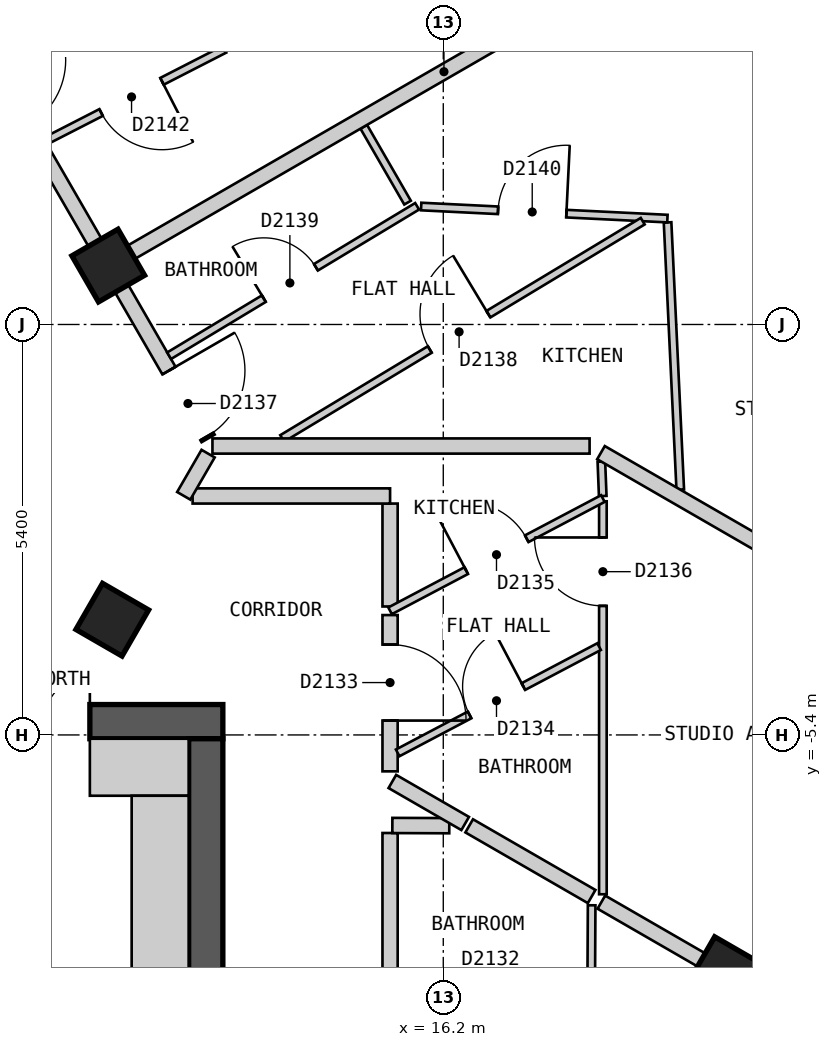
"""IFC4 building model, lengths in metres.
Left out: names, types, materials, properties, quantities, classifications, styles, units other than length and angle.
Written with IfcOpenShell. Run it as: python <this file> out.ifc"""

import sys

from ifc_helpers import new_model, si_unit, direction, frame, frame_2d, origin, origin_2d, place, context, subcontext, project, spatial, polyline, rectangle, outline, extrude, element, fill, save


model = new_model("IFC4")
c1 = context("Model", 3, precision=1e-05, world=origin(), true_north=direction((0.0, 1.0)))
c2 = subcontext(c1, "Body", "Model", "MODEL_VIEW")
j1 = project(units=[si_unit("LENGTHUNIT", "METRE"), si_unit("PLANEANGLEUNIT", "RADIAN")], contexts=[c1])
p1 = place(None, origin())
s1 = spatial("IfcSite", under=j1, at=p1, CompositionType="ELEMENT")
p2 = place(p1, origin())
s2 = spatial("IfcBuilding", under=s1, at=p2, CompositionType="ELEMENT")
p3 = place(p2, frame((0.0, 0.0, 205.8)))
s3 = spatial("IfcBuildingStorey", under=s2, at=p3, CompositionType="ELEMENT", Elevation=205.8)
for number, where, z_axis, x_axis in (
    (1, (19.899, -8.534, 0.0), (0.0, 0.0, 1.0), (0.5, 0.866, 0.0)),
    (2, (11.845, -3.884, 0.0), (0.0, 0.0, 1.0), (0.5, 0.866, 0.0)),
    (3, (11.792, 0.775, 0.0), (0.0, 0.0, 1.0), (-0.5, 0.866, 0.0)),
):
    element("IfcColumn", number, at=place(p3, frame(where, z_axis=z_axis, x_axis=x_axis)), inside=s3, PredefinedType="COLUMN", context=c2, shape_type="SweptSolid", body=[
        extrude(rectangle(XDim=0.7, YDim=0.7, at=origin_2d()), origin(), (0.0, 0.0, 1.0), 3.0),
    ])
p4 = place(p3, frame((-13.3, -5.225, 0.0), z_axis=(0.0, 0.0, 1.0), x_axis=(1.0, 0.0, 0.0)))
e4 = element("IfcWall", 4, at=p4, inside=s3, PredefinedType="SHEAR", context=c2, shape_type="SweptSolid", body=[
    extrude(rectangle(XDim=26.6, YDim=0.45, at=frame_2d((13.3, 0.0))), origin(), (0.0, 0.0, 1.0), 2.7),
])
p5 = place(p4, frame((23.65, 0.0, 0.0)))
e5 = element("IfcOpeningElement", 5, at=p5, cuts=e4, PredefinedType="OPENING", context=c2, shape_type="SweptSolid", body=[
    extrude(rectangle(XDim=1.2, YDim=2.1, at=frame_2d((0.6, 1.05))), frame((0.0, 0.235, 0.0), z_axis=(0.0, -1.0, 0.0), x_axis=(1.0, 0.0, 0.0)), (0.0, 0.0, 1.0), 0.47),
])
p6 = place(p3, frame((13.075, -18.55, 0.0), z_axis=(0.0, 0.0, 1.0), x_axis=(0.0, 1.0, 0.0)))
e6 = element("IfcWall", 6, at=p6, inside=s3, PredefinedType="SHEAR", context=c2, shape_type="SweptSolid", body=[
    extrude(rectangle(XDim=13.1, YDim=0.45, at=frame_2d((6.55, 0.0))), origin(), (0.0, 0.0, 1.0), 2.7),
])
p7 = place(p3, frame((15.285, -18.425, 0.0), z_axis=(0.0, 0.0, 1.0), x_axis=(0.500012653391, 0.866018098222, 0.0)))
e7 = element("IfcWall", 7, at=p7, inside=s3, PredefinedType="SOLIDWALL", context=c2, shape_type="SweptSolid", body=[
    extrude(outline(polyline([(0.0, -0.15), (16.628, -0.15), (16.548, 0.15), (0.08, 0.15), (0.0, -0.15)])), origin(), (0.0, 0.0, 1.0), 2.7),
])
p8 = place(p7, frame((2.444, 0.0, 0.15)))
e8 = element("IfcOpeningElement", 8, at=p8, cuts=e7, PredefinedType="OPENING", context=c2, shape_type="SweptSolid", body=[
    extrude(rectangle(XDim=1.5, YDim=2.1, at=frame_2d((0.75, 1.05))), frame((0.0, 0.16, 0.0), z_axis=(0.0, -1.0, 0.0), x_axis=(1.0, 0.0, 0.0)), (0.0, 0.0, 1.0), 0.32),
])
p9 = place(p7, frame((7.564, 0.0, 0.15)))
e9 = element("IfcOpeningElement", 9, at=p9, cuts=e7, PredefinedType="OPENING", context=c2, shape_type="SweptSolid", body=[
    extrude(rectangle(XDim=1.5, YDim=2.1, at=frame_2d((0.75, 1.05))), frame((0.0, 0.16, 0.0), z_axis=(0.0, -1.0, 0.0), x_axis=(1.0, 0.0, 0.0)), (0.0, 0.0, 1.0), 0.32),
])
p10 = place(p7, frame((12.682, 0.0, 0.15)))
e10 = element("IfcOpeningElement", 10, at=p10, cuts=e7, PredefinedType="OPENING", context=c2, shape_type="SweptSolid", body=[
    extrude(rectangle(XDim=1.5, YDim=2.1, at=frame_2d((0.75, 1.05))), frame((0.0, 0.16, 0.0), z_axis=(0.0, -1.0, 0.0), x_axis=(1.0, 0.0, 0.0)), (0.0, 0.0, 1.0), 0.32),
])
p11 = place(p3, frame((23.599, 0.825, 0.0), z_axis=(0.0, 0.0, 1.0), x_axis=(-0.500003656944, 0.866023292436, 0.0)))
e11 = element("IfcWall", 11, at=p11, inside=s3, PredefinedType="SOLIDWALL", context=c2, shape_type="SweptSolid", body=[
    extrude(outline(polyline([(0.0, -0.15), (22.17, -0.15), (22.09, 0.15), (0.08, 0.15), (0.0, -0.15)])), origin(), (0.0, 0.0, 1.0), 2.7),
])
p12 = place(p11, frame((2.497, 0.0, 0.15)))
e12 = element("IfcOpeningElement", 12, at=p12, cuts=e11, PredefinedType="OPENING", context=c2, shape_type="SweptSolid", body=[
    extrude(rectangle(XDim=1.5, YDim=2.1, at=frame_2d((0.75, 1.05))), frame((0.0, 0.16, 0.0), z_axis=(0.0, -1.0, 0.0), x_axis=(1.0, 0.0, 0.0)), (0.0, 0.0, 1.0), 0.32),
])
p13 = place(p11, frame((7.723, 0.0, 0.15)))
e13 = element("IfcOpeningElement", 13, at=p13, cuts=e11, PredefinedType="OPENING", context=c2, shape_type="SweptSolid", body=[
    extrude(rectangle(XDim=1.5, YDim=2.1, at=frame_2d((0.75, 1.05))), frame((0.0, 0.16, 0.0), z_axis=(0.0, -1.0, 0.0), x_axis=(1.0, 0.0, 0.0)), (0.0, 0.0, 1.0), 0.32),
])
p14 = place(p11, frame((12.948, 0.0, 0.15)))
e14 = element("IfcOpeningElement", 14, at=p14, cuts=e11, PredefinedType="OPENING", context=c2, shape_type="SweptSolid", body=[
    extrude(rectangle(XDim=1.5, YDim=2.1, at=frame_2d((0.75, 1.05))), frame((0.0, 0.16, 0.0), z_axis=(0.0, -1.0, 0.0), x_axis=(1.0, 0.0, 0.0)), (0.0, 0.0, 1.0), 0.32),
])
p15 = place(p11, frame((18.173, 0.0, 0.15)))
e15 = element("IfcOpeningElement", 15, at=p15, cuts=e11, PredefinedType="OPENING", context=c2, shape_type="SweptSolid", body=[
    extrude(rectangle(XDim=1.5, YDim=2.1, at=frame_2d((0.75, 1.05))), frame((0.0, 0.16, 0.0), z_axis=(0.0, -1.0, 0.0), x_axis=(1.0, 0.0, 0.0)), (0.0, 0.0, 1.0), 0.32),
])
p16 = place(p3, frame((9.238, 5.2, 0.0), z_axis=(0.0, 0.0, 1.0), x_axis=(0.500025705601, -0.86601056214, 0.0)))
e16 = element("IfcWall", 16, at=p16, inside=s3, PredefinedType="PARTITIONING", context=c2, shape_type="SweptSolid", body=[
    extrude(rectangle(XDim=7.735, YDim=0.2, at=frame_2d((3.868, 0.0))), origin(), (0.0, 0.0, 1.0), 2.7),
])
p17 = place(p16, frame((6.705, 0.0, 0.0)))
e17 = element("IfcOpeningElement", 17, at=p17, cuts=e16, PredefinedType="OPENING", context=c2, shape_type="SweptSolid", body=[
    extrude(rectangle(XDim=1.0, YDim=2.1, at=frame_2d((0.5, 1.05))), frame((0.0, 0.11, 0.0), z_axis=(0.0, -1.0, 0.0), x_axis=(1.0, 0.0, 0.0)), (0.0, 0.0, 1.0), 0.22),
])
p18 = place(p16, frame((1.988, 0.0, 0.0)))
e18 = element("IfcOpeningElement", 18, at=p18, cuts=e16, PredefinedType="OPENING", context=c2, shape_type="SweptSolid", body=[
    extrude(rectangle(XDim=1.0, YDim=2.1, at=frame_2d((0.5, 1.05))), frame((0.0, 0.11, 0.0), z_axis=(0.0, -1.0, 0.0), x_axis=(1.0, 0.0, 0.0)), (0.0, 0.0, 1.0), 0.22),
])
p19 = place(p3, frame((15.5, -2.356, 0.0), z_axis=(0.0, 0.0, 1.0), x_axis=(0.0, -1.0, 0.0)))
e19 = element("IfcWall", 19, at=p19, inside=s3, PredefinedType="PARTITIONING", context=c2, shape_type="SweptSolid", body=[
    extrude(rectangle(XDim=1.354, YDim=0.2, at=frame_2d((0.677, 0.0))), origin(), (0.0, 0.0, 1.0), 2.7),
])
p20 = place(p3, frame((12.902, -2.256, 0.0), z_axis=(0.0, 0.0, 1.0), x_axis=(1.0, 0.0, 0.0)))
e20 = element("IfcWall", 20, at=p20, inside=s3, PredefinedType="PARTITIONING", context=c2, shape_type="SweptSolid", body=[
    extrude(rectangle(XDim=2.598, YDim=0.2, at=frame_2d((1.299, 0.0))), origin(), (0.0, 0.0, 1.0), 2.7),
])
p21 = place(p3, frame((12.785, -2.254, 0.0), z_axis=(0.0, 0.0, 1.0), x_axis=(0.500766044352, 0.865582675903, 0.0)))
e21 = element("IfcWall", 21, at=p21, inside=s3, PredefinedType="PARTITIONING", context=c2, shape_type="SweptSolid", body=[
    extrude(rectangle(XDim=0.641, YDim=0.2, at=frame_2d((0.321, 0.0))), origin(), (0.0, 0.0, 1.0), 2.7),
])
p22 = place(p3, frame((15.5, -17.752, 0.0), z_axis=(0.0, 0.0, 1.0), x_axis=(0.0, 1.0, 0.0)))
e22 = element("IfcWall", 22, at=p22, inside=s3, PredefinedType="PARTITIONING", context=c2, shape_type="SweptSolid", body=[
    extrude(rectangle(XDim=11.062, YDim=0.2, at=frame_2d((5.531, 0.0))), origin(), (0.0, 0.0, 1.0), 2.7),
])
p23 = place(p22, frame((7.361, 0.0, 0.0)))
e23 = element("IfcOpeningElement", 23, at=p23, cuts=e22, PredefinedType="OPENING", context=c2, shape_type="SweptSolid", body=[
    extrude(rectangle(XDim=1.0, YDim=2.1, at=frame_2d((0.5, 1.05))), frame((0.0, 0.11, 0.0), z_axis=(0.0, -1.0, 0.0), x_axis=(1.0, 0.0, 0.0)), (0.0, 0.0, 1.0), 0.22),
])
p24 = place(p3, frame((15.5, -5.879, 0.0), z_axis=(0.0, 0.0, 1.0), x_axis=(0.0, 1.0, 0.0)))
e24 = element("IfcWall", 24, at=p24, inside=s3, PredefinedType="PARTITIONING", context=c2, shape_type="SweptSolid", body=[
    extrude(rectangle(XDim=2.056, YDim=0.2, at=frame_2d((1.028, 0.0))), origin(), (0.0, 0.0, 1.0), 2.7),
])
p25 = place(p24, frame((0.668, 0.0, 0.0)))
e25 = element("IfcOpeningElement", 25, at=p25, cuts=e24, PredefinedType="OPENING", context=c2, shape_type="SweptSolid", body=[
    extrude(rectangle(XDim=1.0, YDim=2.1, at=frame_2d((0.5, 1.05))), frame((0.0, 0.11, 0.0), z_axis=(0.0, -1.0, 0.0), x_axis=(1.0, 0.0, 0.0)), (0.0, 0.0, 1.0), 0.22),
])
p26 = place(p3, frame((15.154, 2.601, 0.0), z_axis=(0.0, 0.0, 1.0), x_axis=(0.499808046739, -0.866136199691, 0.0)))
e26 = element("IfcWall", 26, at=p26, inside=s3, PredefinedType="PARTITIONING", context=c2, shape_type="SweptSolid", body=[
    extrude(rectangle(XDim=1.152, YDim=0.1, at=frame_2d((0.576, 0.0))), origin(), (0.0, 0.0, 1.0), 2.7),
])
p27 = place(p3, frame((18.28, -1.804, 0.0), z_axis=(0.0, 0.0, 1.0), x_axis=(0.039839036731, -0.999206110446, 0.0)))
e27 = element("IfcWall", 27, at=p27, inside=s3, PredefinedType="PARTITIONING", context=c2, shape_type="SweptSolid", body=[
    extrude(rectangle(XDim=0.453, YDim=0.1, at=frame_2d((0.227, 0.0))), origin(), (0.0, 0.0, 1.0), 2.7),
])
p28 = place(p3, frame((19.151, 1.343, 0.0), z_axis=(0.0, 0.0, 1.0), x_axis=(0.047509130714, -0.998870803707, 0.0)))
e28 = element("IfcWall", 28, at=p28, inside=s3, PredefinedType="PARTITIONING", context=c2, shape_type="SweptSolid", body=[
    extrude(rectangle(XDim=3.52, YDim=0.1, at=frame_2d((1.76, 0.0))), origin(), (0.0, 0.0, 1.0), 2.7),
])
p29 = place(p3, frame((15.909, 1.552, 0.0), z_axis=(0.0, 0.0, 1.0), x_axis=(0.998799003463, -0.048995414909, 0.0)))
e29 = element("IfcWall", 29, at=p29, inside=s3, PredefinedType="PARTITIONING", context=c2, shape_type="SweptSolid", body=[
    extrude(rectangle(XDim=3.244, YDim=0.1, at=frame_2d((1.622, 0.0))), origin(), (0.0, 0.0, 1.0), 2.7),
])
p30 = place(p29, frame((1.013, 0.0, 0.0)))
e30 = element("IfcOpeningElement", 30, at=p30, cuts=e29, PredefinedType="OPENING", context=c2, shape_type="SweptSolid", body=[
    extrude(rectangle(XDim=0.9, YDim=2.1, at=frame_2d((0.45, 1.05))), frame((0.0, 0.06, 0.0), z_axis=(0.0, -1.0, 0.0), x_axis=(1.0, 0.0, 0.0)), (0.0, 0.0, 1.0), 0.12),
])
p31 = place(p3, frame((18.135, -10.893, 0.0), z_axis=(0.0, 0.0, 1.0), x_axis=(0.005255182688, 0.999986191432, 0.0)))
e31 = element("IfcWall", 31, at=p31, inside=s3, PredefinedType="PARTITIONING", context=c2, shape_type="SweptSolid", body=[
    extrude(rectangle(XDim=3.252, YDim=0.1, at=frame_2d((1.626, 0.0))), origin(), (0.0, 0.0, 1.0), 2.7),
])
p32 = place(p3, frame((18.3, -7.496, 0.0), z_axis=(0.0, 0.0, 1.0), x_axis=(0.0, 1.0, 0.0)))
e32 = element("IfcWall", 32, at=p32, inside=s3, PredefinedType="PARTITIONING", context=c2, shape_type="SweptSolid", body=[
    extrude(rectangle(XDim=5.17, YDim=0.1, at=frame_2d((2.585, 0.0))), origin(), (0.0, 0.0, 1.0), 2.7),
])
p33 = place(p32, frame((3.794, 0.0, 0.0)))
e33 = element("IfcOpeningElement", 33, at=p33, cuts=e32, PredefinedType="OPENING", context=c2, shape_type="SweptSolid", body=[
    extrude(rectangle(XDim=0.9, YDim=2.1, at=frame_2d((0.45, 1.05))), frame((0.0, 0.06, 0.0), z_axis=(0.0, -1.0, 0.0), x_axis=(1.0, 0.0, 0.0)), (0.0, 0.0, 1.0), 0.12),
])
p34 = place(p3, frame((10.963, 2.412, 0.0), z_axis=(0.0, 0.0, 1.0), x_axis=(0.889943997558, 0.456069820543, 0.0)))
e34 = element("IfcWall", 34, at=p34, inside=s3, PredefinedType="PARTITIONING", context=c2, shape_type="SweptSolid", body=[
    extrude(rectangle(XDim=2.651, YDim=0.1, at=frame_2d((1.325, 0.0))), origin(), (0.0, 0.0, 1.0), 2.7),
])
p35 = place(p34, frame((0.826, 0.0, 0.0)))
e35 = element("IfcOpeningElement", 35, at=p35, cuts=e34, PredefinedType="OPENING", context=c2, shape_type="SweptSolid", body=[
    extrude(rectangle(XDim=0.9, YDim=2.1, at=frame_2d((0.45, 1.05))), frame((0.0, 0.06, 0.0), z_axis=(0.0, -1.0, 0.0), x_axis=(1.0, 0.0, 0.0)), (0.0, 0.0, 1.0), 0.12),
])
p36 = place(p3, frame((15.5, -3.767, 0.0), z_axis=(0.0, 0.0, 1.0), x_axis=(0.884482889541, 0.466572628976, 0.0)))
e36 = element("IfcWall", 36, at=p36, inside=s3, PredefinedType="PARTITIONING", context=c2, shape_type="SweptSolid", body=[
    extrude(rectangle(XDim=3.166, YDim=0.1, at=frame_2d((1.583, 0.0))), origin(), (0.0, 0.0, 1.0), 2.7),
])
p37 = place(p36, frame((1.133, 0.0, 0.0)))
e37 = element("IfcOpeningElement", 37, at=p37, cuts=e36, PredefinedType="OPENING", context=c2, shape_type="SweptSolid", body=[
    extrude(rectangle(XDim=0.9, YDim=2.1, at=frame_2d((0.45, 1.05))), frame((0.0, 0.06, 0.0), z_axis=(0.0, -1.0, 0.0), x_axis=(1.0, 0.0, 0.0)), (0.0, 0.0, 1.0), 0.12),
])
p38 = place(p3, frame((15.6, -5.636, 0.0), z_axis=(0.0, 0.0, 1.0), x_axis=(0.884468832747, 0.466599275503, 0.0)))
e38 = element("IfcWall", 38, at=p38, inside=s3, PredefinedType="PARTITIONING", context=c2, shape_type="SweptSolid", body=[
    extrude(rectangle(XDim=2.996, YDim=0.1, at=frame_2d((1.498, 0.0))), origin(), (0.0, 0.0, 1.0), 2.7),
])
p39 = place(p38, frame((1.07, 0.0, 0.0)))
e39 = element("IfcOpeningElement", 39, at=p39, cuts=e38, PredefinedType="OPENING", context=c2, shape_type="SweptSolid", body=[
    extrude(rectangle(XDim=0.8, YDim=2.1, at=frame_2d((0.4, 1.05))), frame((0.0, 0.06, 0.0), z_axis=(0.0, -1.0, 0.0), x_axis=(1.0, 0.0, 0.0)), (0.0, 0.0, 1.0), 0.12),
])
p40 = place(p3, frame((12.593, -0.411, 0.0), z_axis=(0.0, 0.0, 1.0), x_axis=(0.856558445359, 0.516050026339, 0.0)))
e40 = element("IfcWall", 40, at=p40, inside=s3, PredefinedType="PARTITIONING", context=c2, shape_type="SweptSolid", body=[
    extrude(rectangle(XDim=3.809, YDim=0.1, at=frame_2d((1.905, 0.0))), origin(), (0.0, 0.0, 1.0), 2.7),
])
p41 = place(p40, frame((1.455, 0.0, 0.0)))
e41 = element("IfcOpeningElement", 41, at=p41, cuts=e40, PredefinedType="OPENING", context=c2, shape_type="SweptSolid", body=[
    extrude(rectangle(XDim=0.8, YDim=2.1, at=frame_2d((0.4, 1.05))), frame((0.0, 0.06, 0.0), z_axis=(0.0, -1.0, 0.0), x_axis=(1.0, 0.0, 0.0)), (0.0, 0.0, 1.0), 0.12),
])
p42 = place(p3, frame((14.081, -1.499, 0.0), z_axis=(0.0, 0.0, 1.0), x_axis=(0.85652273816, 0.516109289798, 0.0)))
e42 = element("IfcWall", 42, at=p42, inside=s3, PredefinedType="PARTITIONING", context=c2, shape_type="SweptSolid", body=[
    extrude(rectangle(XDim=5.537, YDim=0.1, at=frame_2d((2.769, 0.0))), origin(), (0.0, 0.0, 1.0), 2.7),
])
p43 = place(p42, frame((2.267, 0.0, 0.0)))
e43 = element("IfcOpeningElement", 43, at=p43, cuts=e42, PredefinedType="OPENING", context=c2, shape_type="SweptSolid", body=[
    extrude(rectangle(XDim=0.9, YDim=2.1, at=frame_2d((0.45, 1.05))), frame((0.0, 0.06, 0.0), z_axis=(0.0, -1.0, 0.0), x_axis=(1.0, 0.0, 0.0)), (0.0, 0.0, 1.0), 0.12),
])
p44 = place(p3, frame((15.53, -6.591, 0.0), z_axis=(0.0, 0.0, 1.0), x_axis=(0.999992350786, -0.003911312976, 0.0)))
e44 = element("IfcWall", 44, at=p44, inside=s3, PredefinedType="PARTITIONING", context=c2, shape_type="SweptSolid", body=[
    extrude(rectangle(XDim=0.749, YDim=0.2, at=frame_2d((0.375, 0.0))), origin(), (0.0, 0.0, 1.0), 2.7),
])
p45 = place(p3, frame((18.275, -1.686, 0.0), z_axis=(0.0, 0.0, 1.0), x_axis=(0.866041167766, -0.49997269499, 0.0)))
e45 = element("IfcWall", 45, at=p45, inside=s3, PredefinedType="PARTITIONING", context=c2, shape_type="SweptSolid", body=[
    extrude(rectangle(XDim=5.63, YDim=0.2, at=frame_2d((2.815, 0.0))), origin(), (0.0, 0.0, 1.0), 2.7),
])
p46 = place(p3, frame((15.53, -6.012, 0.0), z_axis=(0.0, 0.0, 1.0), x_axis=(0.866075331272, -0.499913513082, 0.0)))
e46 = element("IfcWall", 46, at=p46, inside=s3, PredefinedType="PARTITIONING", context=c2, shape_type="SweptSolid", body=[
    extrude(rectangle(XDim=1.106, YDim=0.2, at=frame_2d((0.553, 0.0))), origin(), (0.0, 0.0, 1.0), 2.7),
])
p47 = place(p3, frame((16.541, -6.596, 0.0), z_axis=(0.0, 0.0, 1.0), x_axis=(0.866078502609, -0.499908018857, 0.0)))
e47 = element("IfcWall", 47, at=p47, inside=s3, PredefinedType="PARTITIONING", context=c2, shape_type="SweptSolid", body=[
    extrude(rectangle(XDim=1.86, YDim=0.2, at=frame_2d((0.93, 0.0))), origin(), (0.0, 0.0, 1.0), 2.7),
])
p48 = place(p3, frame((18.28, -7.6, 0.0), z_axis=(0.0, 0.0, 1.0), x_axis=(0.866072847874, -0.499917815422, 0.0)))
e48 = element("IfcWall", 48, at=p48, inside=s3, PredefinedType="PARTITIONING", context=c2, shape_type="SweptSolid", body=[
    extrude(rectangle(XDim=2.668, YDim=0.2, at=frame_2d((1.334, 0.0))), origin(), (0.0, 0.0, 1.0), 2.7),
])
p49 = place(p3, frame((13.163, -1.599, 0.0), z_axis=(0.0, 0.0, 1.0), x_axis=(1.0, 0.0, 0.0)))
e49 = element("IfcWall", 49, at=p49, inside=s3, PredefinedType="PARTITIONING", context=c2, shape_type="SweptSolid", body=[
    extrude(rectangle(XDim=4.962, YDim=0.2, at=frame_2d((2.481, 0.0))), origin(), (0.0, 0.0, 1.0), 2.7),
])
p50 = place(p3, frame((11.879, 0.826, 0.0), z_axis=(0.0, 0.0, 1.0), x_axis=(0.866065245018, 0.499930986609, 0.0)))
e50 = element("IfcWall", 50, at=p50, inside=s3, PredefinedType="PARTITIONING", context=c2, shape_type="SweptSolid", body=[
    extrude(rectangle(XDim=10.0, YDim=0.2, at=frame_2d((5.0, 0.0))), origin(), (0.0, 0.0, 1.0), 2.7),
])
p51 = place(p3, frame((11.55, -5.825, 0.0), z_axis=(0.0, 0.0, 1.0), x_axis=(1.0, 0.0, 0.0)))
e51 = element("IfcWall", 51, at=p51, inside=s3, PredefinedType="PARTITIONING", context=c2, shape_type="SweptSolid", body=[
    extrude(rectangle(XDim=1.3, YDim=0.75, at=frame_2d((0.65, 0.0))), origin(), (0.0, 0.0, 1.0), 2.7),
])
p52 = place(p3, frame((12.475, -14.45, 0.0), z_axis=(0.0, 0.0, 1.0), x_axis=(0.0, 1.0, 0.0)))
e52 = element("IfcWall", 52, at=p52, inside=s3, PredefinedType="PARTITIONING", context=c2, shape_type="SweptSolid", body=[
    extrude(rectangle(XDim=8.25, YDim=0.75, at=frame_2d((4.125, 0.0))), origin(), (0.0, 0.0, 1.0), 2.7),
])
p53 = place(p25, origin())
e53 = element("IfcDoor", 53, at=p53, inside=s3, OperationType="SINGLE_SWING_LEFT", PredefinedType="DOOR", context=c2, shape_type="SweptSolid", body=[
    extrude(rectangle(XDim=1.0, YDim=2.1, at=frame_2d((0.5, 1.05))), frame((0.0, 0.025, 0.0), z_axis=(0.0, -1.0, 0.0), x_axis=(1.0, 0.0, 0.0)), (0.0, 0.0, 1.0), 0.05),
])
fill(e25, e53)
p54 = place(p39, origin())
e54 = element("IfcDoor", 54, at=p54, inside=s3, OperationType="SINGLE_SWING_RIGHT", PredefinedType="DOOR", context=c2, shape_type="SweptSolid", body=[
    extrude(rectangle(XDim=0.8, YDim=2.1, at=frame_2d((0.4, 1.05))), frame((0.0, 0.025, 0.0), z_axis=(0.0, -1.0, 0.0), x_axis=(1.0, 0.0, 0.0)), (0.0, 0.0, 1.0), 0.05),
])
fill(e39, e54)
p55 = place(p37, origin())
e55 = element("IfcDoor", 55, at=p55, inside=s3, OperationType="SINGLE_SWING_LEFT", PredefinedType="DOOR", context=c2, shape_type="SweptSolid", body=[
    extrude(rectangle(XDim=0.9, YDim=2.1, at=frame_2d((0.45, 1.05))), frame((0.0, 0.025, 0.0), z_axis=(0.0, -1.0, 0.0), x_axis=(1.0, 0.0, 0.0)), (0.0, 0.0, 1.0), 0.05),
])
fill(e37, e55)
p56 = place(p33, origin())
e56 = element("IfcDoor", 56, at=p56, inside=s3, OperationType="SINGLE_SWING_RIGHT", PredefinedType="DOOR", context=c2, shape_type="SweptSolid", body=[
    extrude(rectangle(XDim=0.9, YDim=2.1, at=frame_2d((0.45, 1.05))), frame((0.0, 0.025, 0.0), z_axis=(0.0, -1.0, 0.0), x_axis=(1.0, 0.0, 0.0)), (0.0, 0.0, 1.0), 0.05),
])
fill(e33, e56)
p57 = place(p17, origin())
e57 = element("IfcDoor", 57, at=p57, inside=s3, OperationType="SINGLE_SWING_LEFT", PredefinedType="DOOR", context=c2, shape_type="SweptSolid", body=[
    extrude(rectangle(XDim=1.0, YDim=2.1, at=frame_2d((0.5, 1.05))), frame((0.0, 0.025, 0.0), z_axis=(0.0, -1.0, 0.0), x_axis=(1.0, 0.0, 0.0)), (0.0, 0.0, 1.0), 0.05),
])
fill(e17, e57)
p58 = place(p43, origin())
e58 = element("IfcDoor", 58, at=p58, inside=s3, OperationType="SINGLE_SWING_RIGHT", PredefinedType="DOOR", context=c2, shape_type="SweptSolid", body=[
    extrude(rectangle(XDim=0.9, YDim=2.1, at=frame_2d((0.45, 1.05))), frame((0.0, 0.025, 0.0), z_axis=(0.0, -1.0, 0.0), x_axis=(1.0, 0.0, 0.0)), (0.0, 0.0, 1.0), 0.05),
])
fill(e43, e58)
p59 = place(p41, origin())
e59 = element("IfcDoor", 59, at=p59, inside=s3, OperationType="SINGLE_SWING_LEFT", PredefinedType="DOOR", context=c2, shape_type="SweptSolid", body=[
    extrude(rectangle(XDim=0.8, YDim=2.1, at=frame_2d((0.4, 1.05))), frame((0.0, 0.025, 0.0), z_axis=(0.0, -1.0, 0.0), x_axis=(1.0, 0.0, 0.0)), (0.0, 0.0, 1.0), 0.05),
])
fill(e41, e59)
p60 = place(p30, origin())
e60 = element("IfcDoor", 60, at=p60, inside=s3, OperationType="SINGLE_SWING_RIGHT", PredefinedType="DOOR", context=c2, shape_type="SweptSolid", body=[
    extrude(rectangle(XDim=0.9, YDim=2.1, at=frame_2d((0.45, 1.05))), frame((0.0, 0.025, 0.0), z_axis=(0.0, -1.0, 0.0), x_axis=(1.0, 0.0, 0.0)), (0.0, 0.0, 1.0), 0.05),
])
fill(e30, e60)
p61 = place(p35, origin())
e61 = element("IfcDoor", 61, at=p61, inside=s3, OperationType="SINGLE_SWING_RIGHT", PredefinedType="DOOR", context=c2, shape_type="SweptSolid", body=[
    extrude(rectangle(XDim=0.9, YDim=2.1, at=frame_2d((0.45, 1.05))), frame((0.0, 0.025, 0.0), z_axis=(0.0, -1.0, 0.0), x_axis=(1.0, 0.0, 0.0)), (0.0, 0.0, 1.0), 0.05),
])
fill(e35, e61)
p62 = place(p5, origin())
e62 = element("IfcDoor", 62, at=p62, inside=s3, OperationType="DOUBLE_DOOR_SINGLE_SWING", PredefinedType="DOOR", context=c2, shape_type="SweptSolid", body=[
    extrude(rectangle(XDim=1.2, YDim=2.1, at=frame_2d((0.6, 1.05))), frame((0.0, 0.025, 0.0), z_axis=(0.0, -1.0, 0.0), x_axis=(1.0, 0.0, 0.0)), (0.0, 0.0, 1.0), 0.05),
])
fill(e5, e62)
save(model, sys.argv[1])
